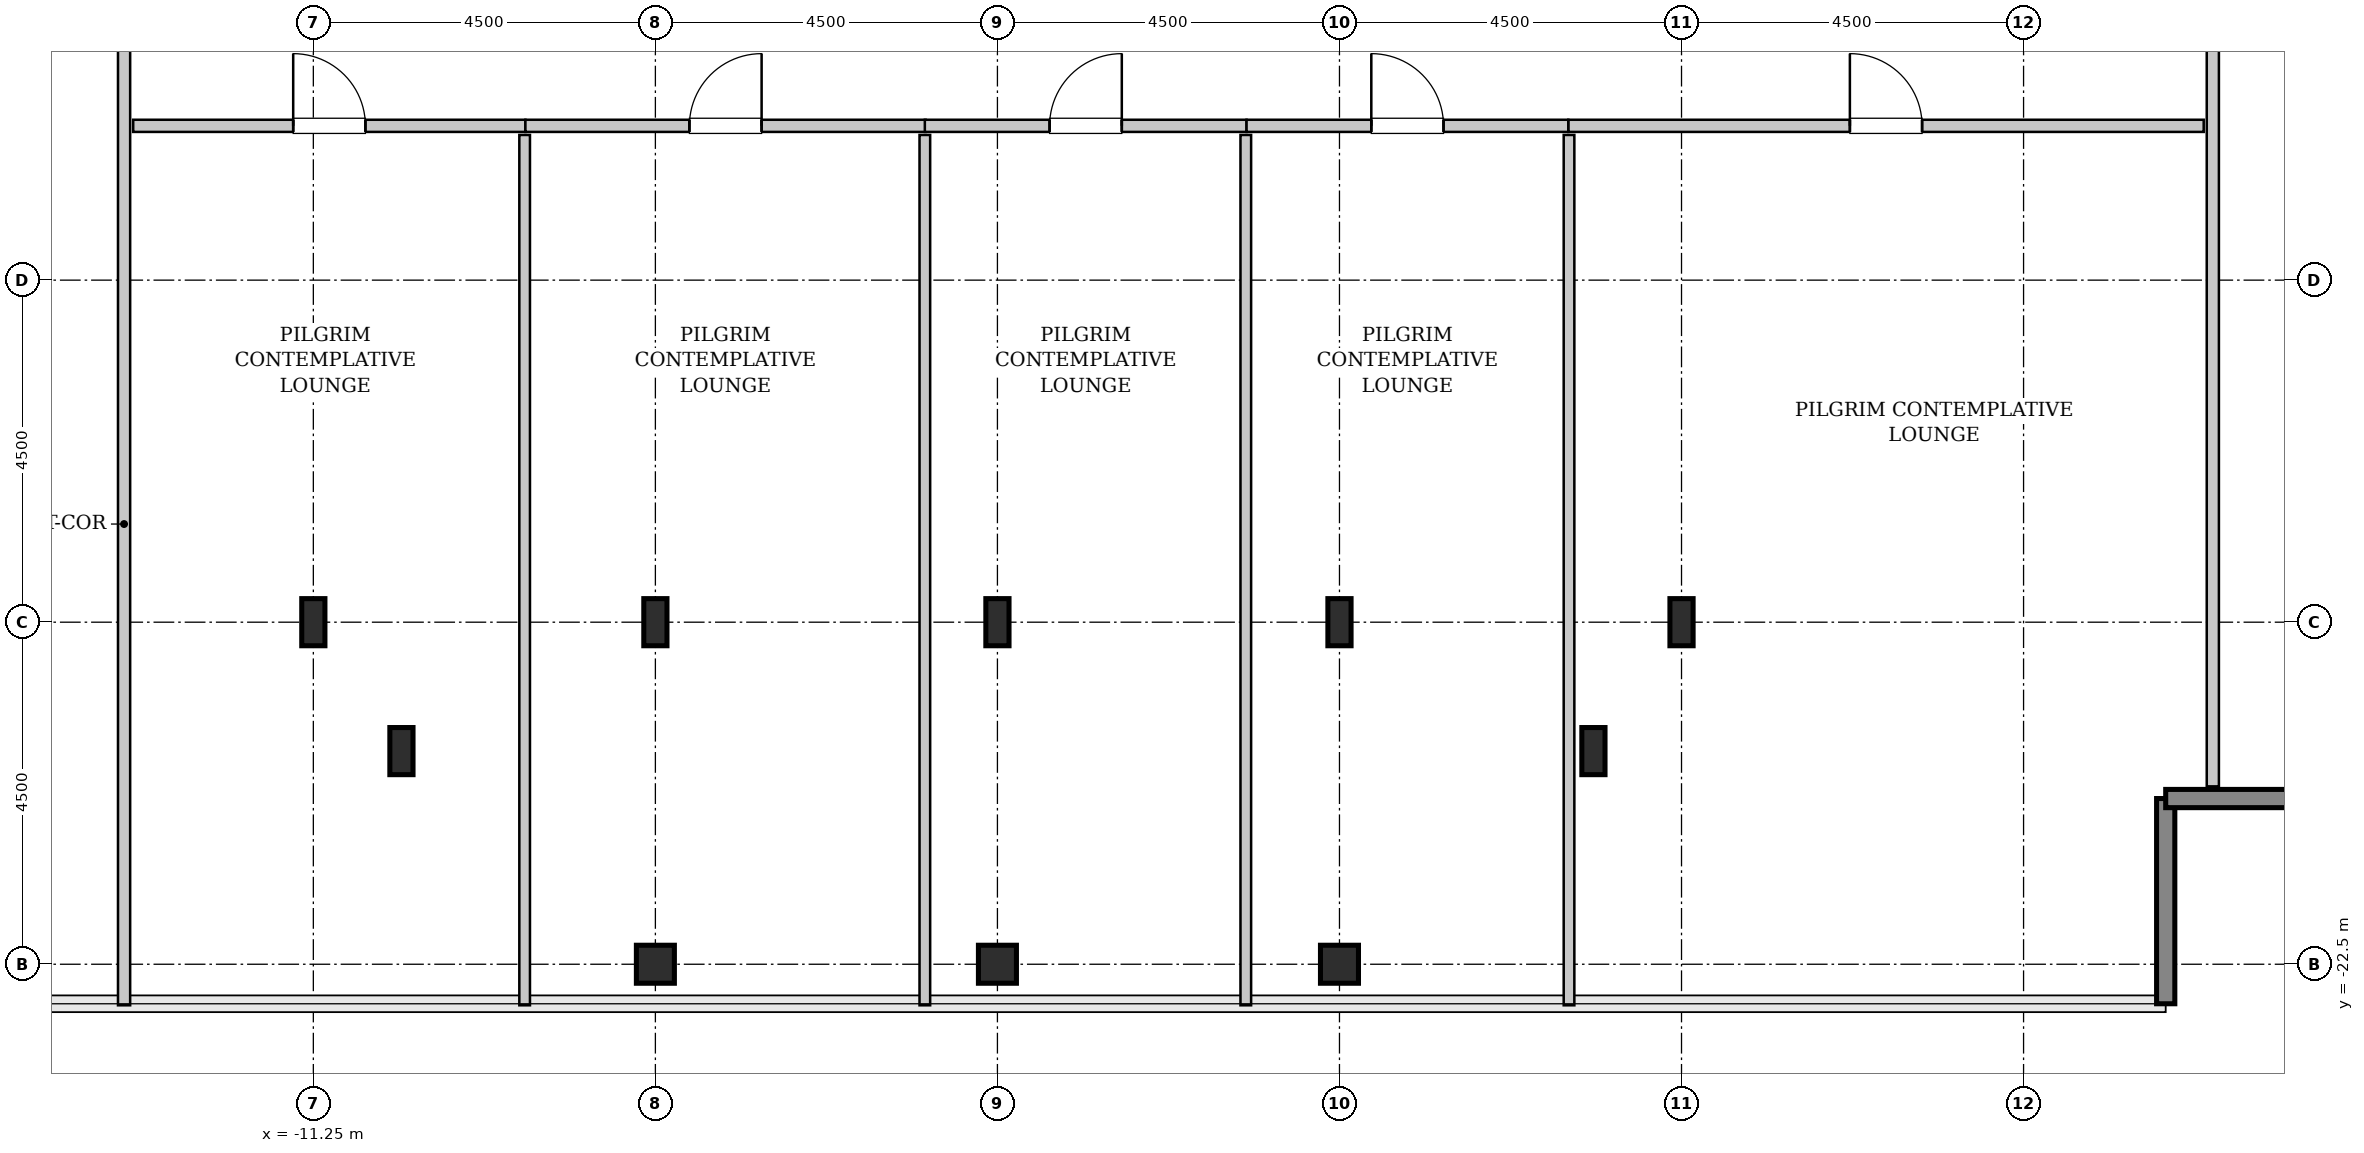
"""IFC4 building model, lengths in metres.
Left out: names, types, materials, properties, quantities, classifications, styles, units other than length and angle.
Written with IfcOpenShell. Run it as: python <this file> out.ifc"""

import sys

from ifc_helpers import new_model, si_unit, direction, frame, frame_2d, origin, origin_2d, place, context, subcontext, project, spatial, rectangle, hollow_rectangle, i_section, extrude, source, transform, mapped, element, fill, save


model = new_model("IFC4")
c1 = context("Model", 3, precision=1e-05, world=origin(), true_north=direction((0.0, 1.0)))
c2 = subcontext(c1, "Body", "Model", "MODEL_VIEW")
j1 = project(units=[si_unit("LENGTHUNIT", "METRE"), si_unit("PLANEANGLEUNIT", "RADIAN")], contexts=[c1])
p1 = place(None, origin())
s1 = spatial("IfcSite", under=j1, at=p1, CompositionType="ELEMENT")
p2 = place(p1, origin())
s2 = spatial("IfcBuilding", under=s1, at=p2, CompositionType="ELEMENT")
p3 = place(p2, frame((0.0, 0.0, 326.2)))
s3 = spatial("IfcBuildingStorey", under=s2, at=p3, CompositionType="ELEMENT", Elevation=326.2)
m1 = source(origin(), c2, "Body", "SweptSolid", [
    extrude(i_section(OverallWidth=0.305, OverallDepth=0.62, WebThickness=0.021, FlangeThickness=0.04, FilletRadius=0.027, at=origin_2d()), origin(), (0.0, 0.0, 1.0), 3.8),
])
for number, where, z_axis, x_axis in (
    (1, (-11.25, -18.0, 0.0), (0.0, 0.0, 1.0), (1.0, 0.0, 0.0)),
    (2, (-10.091, -19.696, 0.0), (0.0, 0.0, 1.0), (1.0, 0.0, 0.0)),
):
    element("IfcColumn", number, at=place(p3, frame(where, z_axis=z_axis, x_axis=x_axis)), inside=s3, PredefinedType="COLUMN", context=c2, shape_type="MappedRepresentation", body=[
        mapped(m1, transform((0.0, 0.0, 0.0), x_axis=(1.0, 0.0, 0.0), y_axis=(0.0, 1.0, 0.0), z_axis=(0.0, 0.0, 1.0), scale=1.0)),
    ])
m2 = source(origin(), c2, "Body", "SweptSolid", [
    extrude(hollow_rectangle(XDim=0.5, YDim=0.5, WallThickness=0.025, InnerFilletRadius=0.025, OuterFilletRadius=0.05, at=origin_2d()), origin(), (0.0, 0.0, 1.0), 3.8),
])
p4 = place(p3, frame((-6.75, -22.5, 0.0), z_axis=(0.0, 0.0, 1.0), x_axis=(1.0, 0.0, 0.0)))
e3 = element("IfcColumn", 3, at=p4, inside=s3, PredefinedType="COLUMN", context=c2, shape_type="MappedRepresentation", body=[
    mapped(m2, transform((0.0, 0.0, 0.0), x_axis=(1.0, 0.0, 0.0), y_axis=(0.0, 1.0, 0.0), z_axis=(0.0, 0.0, 1.0), scale=1.0)),
])
p5 = place(p3, frame((-6.75, -18.0, 0.0), z_axis=(0.0, 0.0, 1.0), x_axis=(1.0, 0.0, 0.0)))
e4 = element("IfcColumn", 4, at=p5, inside=s3, PredefinedType="COLUMN", context=c2, shape_type="MappedRepresentation", body=[
    mapped(m1, transform((0.0, 0.0, 0.0), x_axis=(1.0, 0.0, 0.0), y_axis=(0.0, 1.0, 0.0), z_axis=(0.0, 0.0, 1.0), scale=1.0)),
])
p6 = place(p3, frame((-2.25, -22.5, 0.0), z_axis=(0.0, 0.0, 1.0), x_axis=(1.0, 0.0, 0.0)))
e5 = element("IfcColumn", 5, at=p6, inside=s3, PredefinedType="COLUMN", context=c2, shape_type="MappedRepresentation", body=[
    mapped(m2, transform((0.0, 0.0, 0.0), x_axis=(1.0, 0.0, 0.0), y_axis=(0.0, 1.0, 0.0), z_axis=(0.0, 0.0, 1.0), scale=1.0)),
])
p7 = place(p3, frame((-2.25, -18.0, 0.0), z_axis=(0.0, 0.0, 1.0), x_axis=(1.0, 0.0, 0.0)))
e6 = element("IfcColumn", 6, at=p7, inside=s3, PredefinedType="COLUMN", context=c2, shape_type="MappedRepresentation", body=[
    mapped(m1, transform((0.0, 0.0, 0.0), x_axis=(1.0, 0.0, 0.0), y_axis=(0.0, 1.0, 0.0), z_axis=(0.0, 0.0, 1.0), scale=1.0)),
])
p8 = place(p3, frame((2.25, -22.5, 0.0), z_axis=(0.0, 0.0, 1.0), x_axis=(1.0, 0.0, 0.0)))
e7 = element("IfcColumn", 7, at=p8, inside=s3, PredefinedType="COLUMN", context=c2, shape_type="MappedRepresentation", body=[
    mapped(m2, transform((0.0, 0.0, 0.0), x_axis=(1.0, 0.0, 0.0), y_axis=(0.0, 1.0, 0.0), z_axis=(0.0, 0.0, 1.0), scale=1.0)),
])
for number, where, z_axis, x_axis in (
    (8, (2.25, -18.0, 0.0), (0.0, 0.0, 1.0), (1.0, 0.0, 0.0)),
    (9, (5.591, -19.696, 0.0), (0.0, 0.0, 1.0), (1.0, 0.0, 0.0)),
    (10, (6.75, -18.0, 0.0), (0.0, 0.0, 1.0), (1.0, 0.0, 0.0)),
):
    element("IfcColumn", number, at=place(p3, frame(where, z_axis=z_axis, x_axis=x_axis)), inside=s3, PredefinedType="COLUMN", context=c2, shape_type="MappedRepresentation", body=[
        mapped(m1, transform((0.0, 0.0, 0.0), x_axis=(1.0, 0.0, 0.0), y_axis=(0.0, 1.0, 0.0), z_axis=(0.0, 0.0, 1.0), scale=1.0)),
    ])
m3 = source(origin(), c2, "Body", "SweptSolid", [
    extrude(rectangle(XDim=2.7, YDim=0.24, at=frame_2d((1.35, 0.0))), origin(), (0.0, 0.0, 1.0), 3.55),
])
for number, where, z_axis, x_axis in (
    (11, (13.12, -23.02, 0.0), (0.0, 0.0, 1.0), (0.0, 1.0, 0.0)),
    (12, (13.12, -20.32, 0.0), (0.0, 0.0, 1.0), (1.0, 0.0, 0.0)),
):
    element("IfcWall", number, at=place(p3, frame(where, z_axis=z_axis, x_axis=x_axis)), inside=s3, PredefinedType="SHEAR", context=c2, shape_type="MappedRepresentation", body=[
        mapped(m3, transform((0.0, 0.0, 0.0), x_axis=(1.0, 0.0, 0.0), y_axis=(0.0, 1.0, 0.0), z_axis=(0.0, 0.0, 1.0), scale=1.0)),
    ])
m4 = source(origin(), c2, "Body", "SweptSolid", [
    extrude(rectangle(XDim=14.645, YDim=0.16, at=frame_2d((7.323, 0.0))), origin(), (0.0, 0.0, 1.0), 3.535),
])
p9 = place(p3, frame((-13.74, -23.04, 0.0), z_axis=(0.0, 0.0, 1.0), x_axis=(0.0, 1.0, 0.0)))
e13 = element("IfcWall", 13, at=p9, inside=s3, PredefinedType="PARTITIONING", context=c2, shape_type="MappedRepresentation", body=[
    mapped(m4, transform((0.0, 0.0, 0.0), x_axis=(1.0, 0.0, 0.0), y_axis=(0.0, 1.0, 0.0), z_axis=(0.0, 0.0, 1.0), scale=1.0)),
])
p10 = place(p9, frame((12.613, 0.0, 0.0)))
e14 = element("IfcOpeningElement", 14, at=p10, cuts=e13, PredefinedType="OPENING", context=c2, shape_type="SweptSolid", body=[
    extrude(rectangle(XDim=0.95, YDim=2.1, at=frame_2d((0.475, 1.05))), frame((0.0, 0.09, 0.0), z_axis=(0.0, -1.0, 0.0), x_axis=(1.0, 0.0, 0.0)), (0.0, 0.0, 1.0), 0.18),
])
m5 = source(origin(), c2, "Body", "SweptSolid", [
    extrude(rectangle(XDim=12.365, YDim=0.16, at=frame_2d((6.183, 0.0))), origin(), (0.0, 0.0, 1.0), 3.535),
])
p11 = place(p3, frame((13.74, -20.16, 0.0), z_axis=(0.0, 0.0, 1.0), x_axis=(0.0, 1.0, 0.0)))
e15 = element("IfcWall", 15, at=p11, inside=s3, PredefinedType="PARTITIONING", context=c2, shape_type="MappedRepresentation", body=[
    mapped(m5, transform((0.0, 0.0, 0.0), x_axis=(1.0, 0.0, 0.0), y_axis=(0.0, 1.0, 0.0), z_axis=(0.0, 0.0, 1.0), scale=1.0)),
])
p12 = place(p11, frame((10.032, 0.0, 0.0)))
e16 = element("IfcOpeningElement", 16, at=p12, cuts=e15, PredefinedType="OPENING", context=c2, shape_type="SweptSolid", body=[
    extrude(rectangle(XDim=0.95, YDim=2.1, at=frame_2d((0.475, 1.05))), frame((0.0, 0.09, 0.0), z_axis=(0.0, -1.0, 0.0), x_axis=(1.0, 0.0, 0.0)), (0.0, 0.0, 1.0), 0.18),
])
m6 = source(origin(), c2, "Body", "SweptSolid", [
    extrude(rectangle(XDim=5.16, YDim=0.16, at=frame_2d((2.58, 0.0))), origin(), (0.0, 0.0, 1.0), 3.535),
])
p13 = place(p3, frame((-13.62, -11.47, 0.0), z_axis=(0.0, 0.0, 1.0), x_axis=(1.0, 0.0, 0.0)))
e17 = element("IfcWall", 17, at=p13, inside=s3, PredefinedType="PARTITIONING", context=c2, shape_type="MappedRepresentation", body=[
    mapped(m6, transform((0.0, 0.0, 0.0), x_axis=(1.0, 0.0, 0.0), y_axis=(0.0, 1.0, 0.0), z_axis=(0.0, 0.0, 1.0), scale=1.0)),
])
p14 = place(p13, frame((2.105, 0.0, 0.0)))
e18 = element("IfcOpeningElement", 18, at=p14, cuts=e17, PredefinedType="OPENING", context=c2, shape_type="SweptSolid", body=[
    extrude(rectangle(XDim=0.95, YDim=2.1, at=frame_2d((0.475, 1.05))), frame((0.0, 0.09, 0.0), z_axis=(0.0, -1.0, 0.0), x_axis=(1.0, 0.0, 0.0)), (0.0, 0.0, 1.0), 0.18),
])
m7 = source(origin(), c2, "Body", "SweptSolid", [
    extrude(rectangle(XDim=11.45, YDim=0.14, at=frame_2d((5.725, 0.0))), origin(), (0.0, 0.0, 1.0), 3.535),
])
p15 = place(p3, frame((-8.47, -23.04, 0.0), z_axis=(0.0, 0.0, 1.0), x_axis=(0.0, 1.0, 0.0)))
e19 = element("IfcWall", 19, at=p15, inside=s3, PredefinedType="PARTITIONING", context=c2, shape_type="MappedRepresentation", body=[
    mapped(m7, transform((0.0, 0.0, 0.0), x_axis=(1.0, 0.0, 0.0), y_axis=(0.0, 1.0, 0.0), z_axis=(0.0, 0.0, 1.0), scale=1.0)),
])
m8 = source(origin(), c2, "Body", "SweptSolid", [
    extrude(rectangle(XDim=5.265, YDim=0.16, at=frame_2d((2.632, 0.0))), origin(), (0.0, 0.0, 1.0), 3.535),
])
p16 = place(p3, frame((-8.46, -11.47, 0.0), z_axis=(0.0, 0.0, 1.0), x_axis=(1.0, 0.0, 0.0)))
e20 = element("IfcWall", 20, at=p16, inside=s3, PredefinedType="PARTITIONING", context=c2, shape_type="MappedRepresentation", body=[
    mapped(m8, transform((0.0, 0.0, 0.0), x_axis=(1.0, 0.0, 0.0), y_axis=(0.0, 1.0, 0.0), z_axis=(0.0, 0.0, 1.0), scale=1.0)),
])
p17 = place(p16, frame((2.157, 0.0, 0.0)))
e21 = element("IfcOpeningElement", 21, at=p17, cuts=e20, PredefinedType="OPENING", context=c2, shape_type="SweptSolid", body=[
    extrude(rectangle(XDim=0.95, YDim=2.1, at=frame_2d((0.475, 1.05))), frame((0.0, 0.09, 0.0), z_axis=(0.0, -1.0, 0.0), x_axis=(1.0, 0.0, 0.0)), (0.0, 0.0, 1.0), 0.18),
])
p18 = place(p3, frame((-3.205, -23.04, 0.0), z_axis=(0.0, 0.0, 1.0), x_axis=(0.0, 1.0, 0.0)))
e22 = element("IfcWall", 22, at=p18, inside=s3, PredefinedType="PARTITIONING", context=c2, shape_type="MappedRepresentation", body=[
    mapped(m7, transform((0.0, 0.0, 0.0), x_axis=(1.0, 0.0, 0.0), y_axis=(0.0, 1.0, 0.0), z_axis=(0.0, 0.0, 1.0), scale=1.0)),
])
m9 = source(origin(), c2, "Body", "SweptSolid", [
    extrude(rectangle(XDim=8.36, YDim=0.16, at=frame_2d((4.18, 0.0))), origin(), (0.0, 0.0, 1.0), 3.535),
])
p19 = place(p3, frame((5.26, -11.47, 0.0), z_axis=(0.0, 0.0, 1.0), x_axis=(1.0, 0.0, 0.0)))
e23 = element("IfcWall", 23, at=p19, inside=s3, PredefinedType="PARTITIONING", context=c2, shape_type="MappedRepresentation", body=[
    mapped(m9, transform((0.0, 0.0, 0.0), x_axis=(1.0, 0.0, 0.0), y_axis=(0.0, 1.0, 0.0), z_axis=(0.0, 0.0, 1.0), scale=1.0)),
])
p20 = place(p19, frame((3.705, 0.0, 0.0)))
e24 = element("IfcOpeningElement", 24, at=p20, cuts=e23, PredefinedType="OPENING", context=c2, shape_type="SweptSolid", body=[
    extrude(rectangle(XDim=0.95, YDim=2.1, at=frame_2d((0.475, 1.05))), frame((0.0, 0.09, 0.0), z_axis=(0.0, -1.0, 0.0), x_axis=(1.0, 0.0, 0.0)), (0.0, 0.0, 1.0), 0.18),
])
p21 = place(p3, frame((5.27, -23.04, 0.0), z_axis=(0.0, 0.0, 1.0), x_axis=(0.0, 1.0, 0.0)))
e25 = element("IfcWall", 25, at=p21, inside=s3, PredefinedType="PARTITIONING", context=c2, shape_type="MappedRepresentation", body=[
    mapped(m7, transform((0.0, 0.0, 0.0), x_axis=(1.0, 0.0, 0.0), y_axis=(0.0, 1.0, 0.0), z_axis=(0.0, 0.0, 1.0), scale=1.0)),
])
m10 = source(origin(), c2, "Body", "SweptSolid", [
    extrude(rectangle(XDim=4.233, YDim=0.16, at=frame_2d((2.116, 0.0))), origin(), (0.0, 0.0, 1.0), 3.535),
])
p22 = place(p3, frame((-3.205, -11.47, 0.0), z_axis=(0.0, 0.0, 1.0), x_axis=(1.0, 0.0, 0.0)))
e26 = element("IfcWall", 26, at=p22, inside=s3, PredefinedType="PARTITIONING", context=c2, shape_type="MappedRepresentation", body=[
    mapped(m10, transform((0.0, 0.0, 0.0), x_axis=(1.0, 0.0, 0.0), y_axis=(0.0, 1.0, 0.0), z_axis=(0.0, 0.0, 1.0), scale=1.0)),
])
p23 = place(p22, frame((1.641, 0.0, 0.0)))
e27 = element("IfcOpeningElement", 27, at=p23, cuts=e26, PredefinedType="OPENING", context=c2, shape_type="SweptSolid", body=[
    extrude(rectangle(XDim=0.95, YDim=2.1, at=frame_2d((0.475, 1.05))), frame((0.0, 0.09, 0.0), z_axis=(0.0, -1.0, 0.0), x_axis=(1.0, 0.0, 0.0)), (0.0, 0.0, 1.0), 0.18),
])
p24 = place(p3, frame((1.018, -23.04, 0.0), z_axis=(0.0, 0.0, 1.0), x_axis=(0.0, 1.0, 0.0)))
e28 = element("IfcWall", 28, at=p24, inside=s3, PredefinedType="PARTITIONING", context=c2, shape_type="MappedRepresentation", body=[
    mapped(m7, transform((0.0, 0.0, 0.0), x_axis=(1.0, 0.0, 0.0), y_axis=(0.0, 1.0, 0.0), z_axis=(0.0, 0.0, 1.0), scale=1.0)),
])
m11 = source(origin(), c2, "Body", "SweptSolid", [
    extrude(rectangle(XDim=4.232, YDim=0.16, at=frame_2d((2.116, 0.0))), origin(), (0.0, 0.0, 1.0), 3.535),
])
p25 = place(p3, frame((1.028, -11.47, 0.0), z_axis=(0.0, 0.0, 1.0), x_axis=(1.0, 0.0, 0.0)))
e29 = element("IfcWall", 29, at=p25, inside=s3, PredefinedType="PARTITIONING", context=c2, shape_type="MappedRepresentation", body=[
    mapped(m11, transform((0.0, 0.0, 0.0), x_axis=(1.0, 0.0, 0.0), y_axis=(0.0, 1.0, 0.0), z_axis=(0.0, 0.0, 1.0), scale=1.0)),
])
p26 = place(p25, frame((1.641, 0.0, 0.0)))
e30 = element("IfcOpeningElement", 30, at=p26, cuts=e29, PredefinedType="OPENING", context=c2, shape_type="SweptSolid", body=[
    extrude(rectangle(XDim=0.95, YDim=2.1, at=frame_2d((0.475, 1.05))), frame((0.0, 0.09, 0.0), z_axis=(0.0, -1.0, 0.0), x_axis=(1.0, 0.0, 0.0)), (0.0, 0.0, 1.0), 0.18),
])
m12 = source(origin(), c2, "Body", "SweptSolid", [
    extrude(rectangle(XDim=0.95, YDim=2.1, at=frame_2d((0.475, 1.05))), frame((0.0, 0.025, 0.0), z_axis=(0.0, -1.0, 0.0), x_axis=(1.0, 0.0, 0.0)), (0.0, 0.0, 1.0), 0.05),
])
p27 = place(p14, origin())
e31 = element("IfcDoor", 31, at=p27, inside=s3, OperationType="SINGLE_SWING_LEFT", PredefinedType="DOOR", context=c2, shape_type="MappedRepresentation", body=[
    mapped(m12, transform((0.0, 0.0, 0.0), x_axis=(1.0, 0.0, 0.0), y_axis=(0.0, 1.0, 0.0), z_axis=(0.0, 0.0, 1.0), scale=1.0)),
])
fill(e18, e31)
p28 = place(p17, origin())
e32 = element("IfcDoor", 32, at=p28, inside=s3, OperationType="SINGLE_SWING_RIGHT", PredefinedType="DOOR", context=c2, shape_type="MappedRepresentation", body=[
    mapped(m12, transform((0.0, 0.0, 0.0), x_axis=(1.0, 0.0, 0.0), y_axis=(0.0, 1.0, 0.0), z_axis=(0.0, 0.0, 1.0), scale=1.0)),
])
fill(e21, e32)
p29 = place(p20, origin())
e33 = element("IfcDoor", 33, at=p29, inside=s3, OperationType="SINGLE_SWING_LEFT", PredefinedType="DOOR", context=c2, shape_type="MappedRepresentation", body=[
    mapped(m12, transform((0.0, 0.0, 0.0), x_axis=(1.0, 0.0, 0.0), y_axis=(0.0, 1.0, 0.0), z_axis=(0.0, 0.0, 1.0), scale=1.0)),
])
fill(e24, e33)
p30 = place(p23, origin())
e34 = element("IfcDoor", 34, at=p30, inside=s3, OperationType="SINGLE_SWING_RIGHT", PredefinedType="DOOR", context=c2, shape_type="MappedRepresentation", body=[
    mapped(m12, transform((0.0, 0.0, 0.0), x_axis=(1.0, 0.0, 0.0), y_axis=(0.0, 1.0, 0.0), z_axis=(0.0, 0.0, 1.0), scale=1.0)),
])
fill(e27, e34)
p31 = place(p26, origin())
e35 = element("IfcDoor", 35, at=p31, inside=s3, OperationType="SINGLE_SWING_LEFT", PredefinedType="DOOR", context=c2, shape_type="MappedRepresentation", body=[
    mapped(m12, transform((0.0, 0.0, 0.0), x_axis=(1.0, 0.0, 0.0), y_axis=(0.0, 1.0, 0.0), z_axis=(0.0, 0.0, 1.0), scale=1.0)),
])
fill(e30, e35)
save(model, sys.argv[1])
